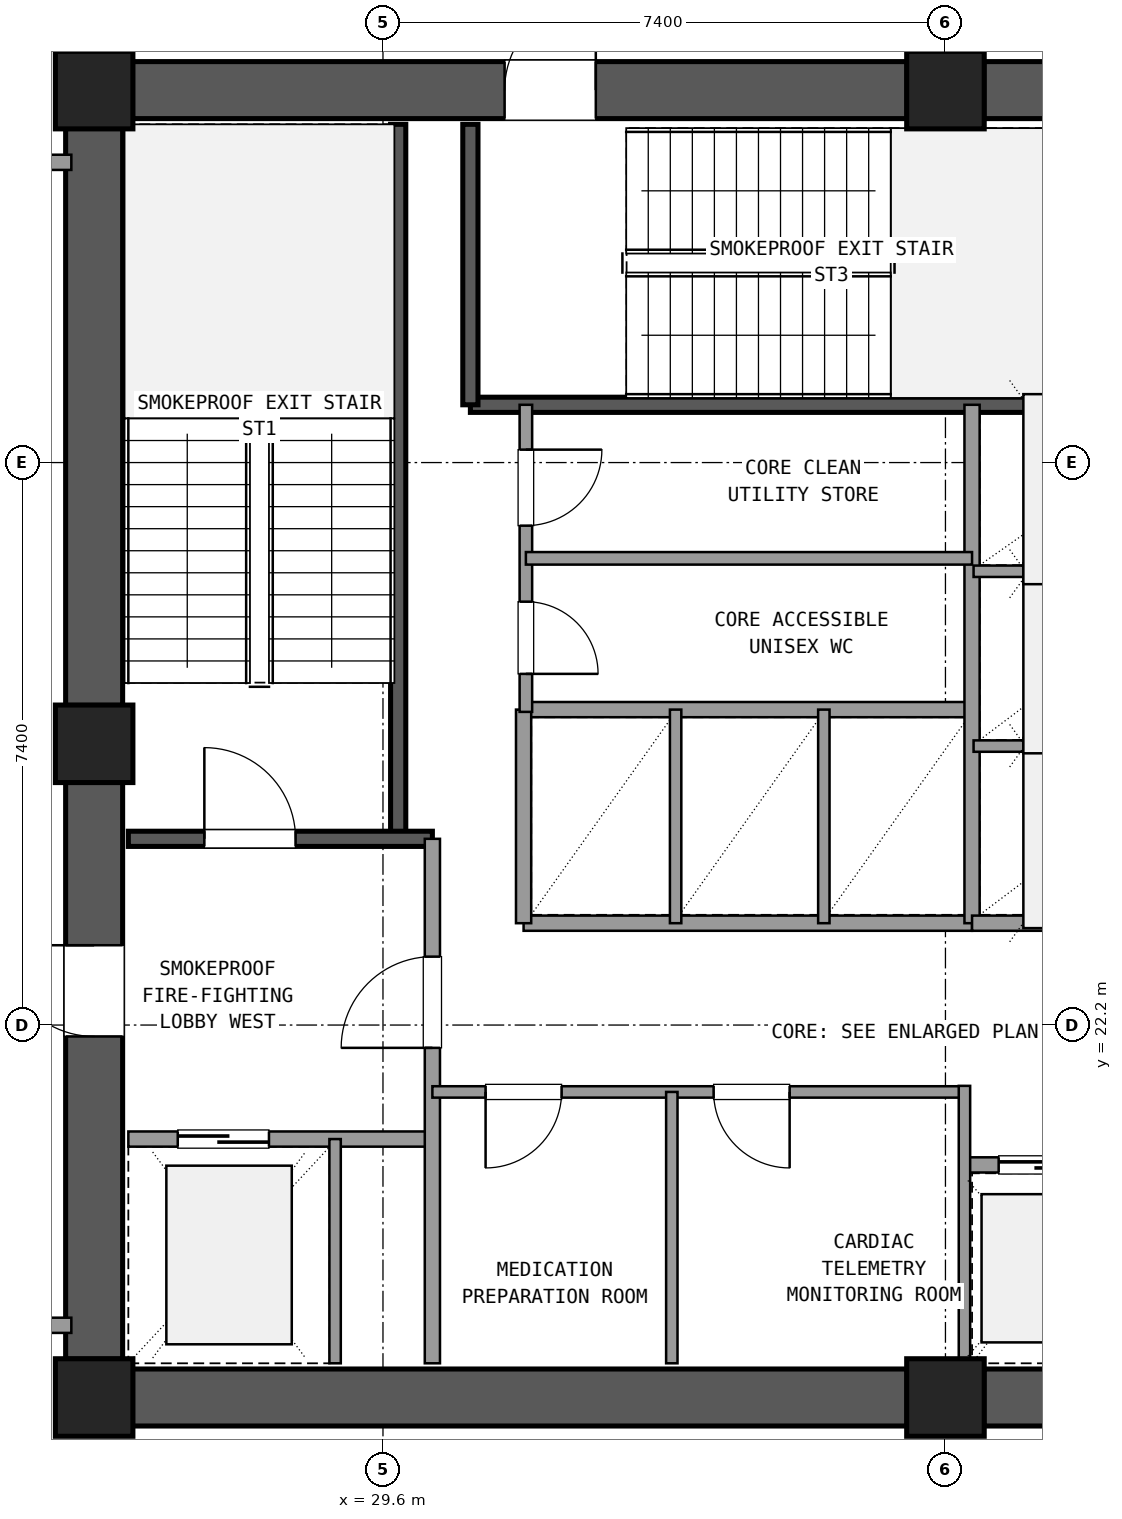
"""IFC4 building model, lengths in metres.
Left out: names, types, materials, properties, quantities, classifications, styles, units other than length and angle.
Written with IfcOpenShell. Run it as: python <this file> out.ifc"""

import sys

from ifc_helpers import new_model, si_unit, direction, frame, frame_2d, origin, origin_2d, place, context, subcontext, project, spatial, rectangle, extrude, element, fill, save


model = new_model("IFC4")
c1 = context("Model", 3, precision=1e-05, world=origin(), true_north=direction((0.0, 1.0)))
c2 = subcontext(c1, "Body", "Model", "MODEL_VIEW")
j1 = project(units=[si_unit("LENGTHUNIT", "METRE"), si_unit("PLANEANGLEUNIT", "RADIAN")], contexts=[c1])
p1 = place(None, origin())
s1 = spatial("IfcSite", under=j1, at=p1, CompositionType="ELEMENT")
p2 = place(p1, origin())
s2 = spatial("IfcBuilding", under=s1, at=p2, CompositionType="ELEMENT")
p3 = place(p2, frame((0.0, 0.0, 178.02)))
s3 = spatial("IfcBuildingStorey", under=s2, at=p3, CompositionType="ELEMENT", Elevation=178.02)
for number, where, z_axis, x_axis in (
    (1, (25.8, 17.3, 0.0), (0.0, 0.0, 1.0), (1.0, 0.0, 0.0)),
    (2, (37.0, 17.3, 0.0), (0.0, 0.0, 1.0), (1.0, 0.0, 0.0)),
    (3, (37.0, 34.5, 0.0), (0.0, 0.0, 1.0), (1.0, 0.0, 0.0)),
    (4, (25.8, 34.5, 0.0), (0.0, 0.0, 1.0), (1.0, 0.0, 0.0)),
    (5, (25.8, 25.9, 0.0), (0.0, 0.0, 1.0), (1.0, 0.0, 0.0)),
):
    element("IfcColumn", number, at=place(p3, frame(where, z_axis=z_axis, x_axis=x_axis)), inside=s3, PredefinedType="COLUMN", context=c2, shape_type="SweptSolid", body=[
        extrude(rectangle(XDim=1.02, YDim=1.02, at=origin_2d()), origin(), (0.0, 0.0, 1.0), 4.68),
    ])
for number, where, z_axis, x_axis in (
    (6, (26.305, 17.3, 0.0), (0.0, 0.0, 1.0), (1.0, 0.0, 0.0)),
    (7, (37.505, 17.3, 0.0), (0.0, 0.0, 1.0), (1.0, 0.0, 0.0)),
):
    element("IfcWall", number, at=place(p3, frame(where, z_axis=z_axis, x_axis=x_axis)), inside=s3, PredefinedType="SHEAR", context=c2, shape_type="SweptSolid", body=[
        extrude(rectangle(XDim=10.19, YDim=0.75, at=frame_2d((5.095, 0.0))), origin(), (0.0, 0.0, 1.0), 4.38),
    ])
p4 = place(p3, frame((47.695, 34.5, 0.0), z_axis=(0.0, 0.0, 1.0), x_axis=(-1.0, 0.0, 0.0)))
e8 = element("IfcWall", 8, at=p4, inside=s3, PredefinedType="SHEAR", context=c2, shape_type="SweptSolid", body=[
    extrude(rectangle(XDim=10.19, YDim=0.75, at=frame_2d((5.095, 0.0))), origin(), (0.0, 0.0, 1.0), 4.38),
])
p5 = place(p4, frame((4.595, 0.0, 0.0)))
e9 = element("IfcOpeningElement", 9, at=p5, cuts=e8, PredefinedType="OPENING", context=c2, shape_type="SweptSolid", body=[
    extrude(rectangle(XDim=1.6, YDim=2.2, at=frame_2d((0.8, 1.1))), frame((0.0, 0.385, 0.0), z_axis=(0.0, -1.0, 0.0), x_axis=(1.0, 0.0, 0.0)), (0.0, 0.0, 1.0), 0.77),
])
p6 = place(p3, frame((36.495, 34.5, 0.0), z_axis=(0.0, 0.0, 1.0), x_axis=(-1.0, 0.0, 0.0)))
e10 = element("IfcWall", 10, at=p6, inside=s3, PredefinedType="SHEAR", context=c2, shape_type="SweptSolid", body=[
    extrude(rectangle(XDim=10.19, YDim=0.75, at=frame_2d((5.095, 0.0))), origin(), (0.0, 0.0, 1.0), 4.38),
])
p7 = place(p6, frame((4.095, 0.0, 0.0)))
e11 = element("IfcOpeningElement", 11, at=p7, cuts=e10, PredefinedType="OPENING", context=c2, shape_type="SweptSolid", body=[
    extrude(rectangle(XDim=1.2, YDim=2.15, at=frame_2d((0.6, 1.075))), frame((0.0, 0.385, 0.0), z_axis=(0.0, -1.0, 0.0), x_axis=(1.0, 0.0, 0.0)), (0.0, 0.0, 1.0), 0.77),
])
p8 = place(p3, frame((25.8, 33.995, 0.0), z_axis=(0.0, 0.0, 1.0), x_axis=(0.0, -1.0, 0.0)))
e12 = element("IfcWall", 12, at=p8, inside=s3, PredefinedType="SHEAR", context=c2, shape_type="SweptSolid", body=[
    extrude(rectangle(XDim=7.59, YDim=0.75, at=frame_2d((3.795, 0.0))), origin(), (0.0, 0.0, 1.0), 4.38),
])
p9 = place(p3, frame((25.8, 25.395, 0.0), z_axis=(0.0, 0.0, 1.0), x_axis=(0.0, -1.0, 0.0)))
e13 = element("IfcWall", 13, at=p9, inside=s3, PredefinedType="SHEAR", context=c2, shape_type="SweptSolid", body=[
    extrude(rectangle(XDim=7.59, YDim=0.75, at=frame_2d((3.795, 0.0))), origin(), (0.0, 0.0, 1.0), 4.38),
])
p10 = place(p9, frame((2.145, 0.0, 0.0)))
e14 = element("IfcOpeningElement", 14, at=p10, cuts=e13, PredefinedType="OPENING", context=c2, shape_type="SweptSolid", body=[
    extrude(rectangle(XDim=1.2, YDim=2.15, at=frame_2d((0.6, 1.075))), frame((0.0, 0.385, 0.0), z_axis=(0.0, -1.0, 0.0), x_axis=(1.0, 0.0, 0.0)), (0.0, 0.0, 1.0), 0.77),
])
p11 = place(p3, frame((29.8, 24.65, 0.0), z_axis=(0.0, 0.0, 1.0), x_axis=(0.0, 1.0, 0.0)))
e15 = element("IfcWall", 15, at=p11, inside=s3, PredefinedType="SHEAR", context=c2, shape_type="SweptSolid", body=[
    extrude(rectangle(XDim=9.4, YDim=0.2, at=frame_2d((4.7, 0.0))), origin(), (0.0, 0.0, 1.0), 4.38),
])
p12 = place(p3, frame((26.25, 24.65, 0.0), z_axis=(0.0, 0.0, 1.0), x_axis=(1.0, 0.0, 0.0)))
e16 = element("IfcWall", 16, at=p12, inside=s3, PredefinedType="SHEAR", context=c2, shape_type="SweptSolid", body=[
    extrude(rectangle(XDim=4.0, YDim=0.2, at=frame_2d((2.0, 0.0))), origin(), (0.0, 0.0, 1.0), 4.38),
])
p13 = place(p12, frame((1.0, 0.0, 0.0)))
e17 = element("IfcOpeningElement", 17, at=p13, cuts=e16, PredefinedType="OPENING", context=c2, shape_type="SweptSolid", body=[
    extrude(rectangle(XDim=1.2, YDim=2.15, at=frame_2d((0.6, 1.075))), frame((0.0, 0.11, 0.0), z_axis=(0.0, -1.0, 0.0), x_axis=(1.0, 0.0, 0.0)), (0.0, 0.0, 1.0), 0.22),
])
p14 = place(p3, frame((30.75, 30.36, 0.0), z_axis=(0.0, 0.0, 1.0), x_axis=(1.0, 0.0, 0.0)))
e18 = element("IfcWall", 18, at=p14, inside=s3, PredefinedType="SHEAR", context=c2, shape_type="SweptSolid", body=[
    extrude(rectangle(XDim=9.5, YDim=0.2, at=frame_2d((4.75, 0.0))), origin(), (0.0, 0.0, 1.0), 4.38),
])
p15 = place(p3, frame((30.75, 30.36, 0.0), z_axis=(0.0, 0.0, 1.0), x_axis=(0.0, 1.0, 0.0)))
e19 = element("IfcWall", 19, at=p15, inside=s3, PredefinedType="SHEAR", context=c2, shape_type="SweptSolid", body=[
    extrude(rectangle(XDim=3.69, YDim=0.2, at=frame_2d((1.845, 0.0))), origin(), (0.0, 0.0, 1.0), 4.38),
])
p16 = place(p3, frame((26.25, 20.7, 0.0), z_axis=(0.0, 0.0, 1.0), x_axis=(1.0, 0.0, 0.0)))
e20 = element("IfcWall", 20, at=p16, inside=s3, PredefinedType="SOLIDWALL", context=c2, shape_type="SweptSolid", body=[
    extrude(rectangle(XDim=4.0, YDim=0.2, at=frame_2d((2.0, 0.0))), origin(), (0.0, 0.0, 1.0), 3.49),
])
p17 = place(p16, frame((0.65, 0.0, 0.0)))
e21 = element("IfcOpeningElement", 21, at=p17, cuts=e20, PredefinedType="OPENING", context=c2, shape_type="SweptSolid", body=[
    extrude(rectangle(XDim=1.2, YDim=2.15, at=frame_2d((0.6, 1.075))), frame((0.0, 0.11, 0.0), z_axis=(0.0, -1.0, 0.0), x_axis=(1.0, 0.0, 0.0)), (0.0, 0.0, 1.0), 0.22),
])
p18 = place(p3, frame((30.25, 17.75, 0.0), z_axis=(0.0, 0.0, 1.0), x_axis=(0.0, 1.0, 0.0)))
e22 = element("IfcWall", 22, at=p18, inside=s3, PredefinedType="SOLIDWALL", context=c2, shape_type="SweptSolid", body=[
    extrude(rectangle(XDim=6.9, YDim=0.2, at=frame_2d((3.45, 0.0))), origin(), (0.0, 0.0, 1.0), 3.49),
])
p19 = place(p18, frame((4.15, 0.0, 0.0)))
e23 = element("IfcOpeningElement", 23, at=p19, cuts=e22, PredefinedType="OPENING", context=c2, shape_type="SweptSolid", body=[
    extrude(rectangle(XDim=1.2, YDim=2.15, at=frame_2d((0.6, 1.075))), frame((0.0, 0.11, 0.0), z_axis=(0.0, -1.0, 0.0), x_axis=(1.0, 0.0, 0.0)), (0.0, 0.0, 1.0), 0.22),
])
p20 = place(p3, frame((28.97, 17.75, 0.0), z_axis=(0.0, 0.0, 1.0), x_axis=(0.0, 1.0, 0.0)))
e24 = element("IfcWall", 24, at=p20, inside=s3, PredefinedType="PARTITIONING", context=c2, shape_type="SweptSolid", body=[
    extrude(rectangle(XDim=2.95, YDim=0.15, at=frame_2d((1.475, 0.0))), origin(), (0.0, 0.0, 1.0), 3.49),
])
p21 = place(p3, frame((30.25, 21.32, 0.0), z_axis=(0.0, 0.0, 1.0), x_axis=(1.0, 0.0, 0.0)))
e25 = element("IfcWall", 25, at=p21, inside=s3, PredefinedType="PARTITIONING", context=c2, shape_type="SweptSolid", body=[
    extrude(rectangle(XDim=7.0, YDim=0.15, at=frame_2d((3.5, 0.0))), origin(), (0.0, 0.0, 1.0), 3.49),
])
p22 = place(p21, frame((0.7, 0.0, 0.0)))
e26 = element("IfcOpeningElement", 26, at=p22, cuts=e25, PredefinedType="OPENING", context=c2, shape_type="SweptSolid", body=[
    extrude(rectangle(XDim=1.0, YDim=2.15, at=frame_2d((0.5, 1.075))), frame((0.0, 0.085, 0.0), z_axis=(0.0, -1.0, 0.0), x_axis=(1.0, 0.0, 0.0)), (0.0, 0.0, 1.0), 0.17),
])
p23 = place(p21, frame((3.7, 0.0, 0.0)))
e27 = element("IfcOpeningElement", 27, at=p23, cuts=e25, PredefinedType="OPENING", context=c2, shape_type="SweptSolid", body=[
    extrude(rectangle(XDim=1.0, YDim=2.15, at=frame_2d((0.5, 1.075))), frame((0.0, 0.085, 0.0), z_axis=(0.0, -1.0, 0.0), x_axis=(1.0, 0.0, 0.0)), (0.0, 0.0, 1.0), 0.17),
])
p24 = place(p3, frame((33.4, 17.75, 0.0), z_axis=(0.0, 0.0, 1.0), x_axis=(0.0, 1.0, 0.0)))
e28 = element("IfcWall", 28, at=p24, inside=s3, PredefinedType="PARTITIONING", context=c2, shape_type="SweptSolid", body=[
    extrude(rectangle(XDim=3.57, YDim=0.15, at=frame_2d((1.785, 0.0))), origin(), (0.0, 0.0, 1.0), 3.49),
])
p25 = place(p3, frame((37.25, 20.36, 0.0), z_axis=(0.0, 0.0, 1.0), x_axis=(1.0, 0.0, 0.0)))
e29 = element("IfcWall", 29, at=p25, inside=s3, PredefinedType="SOLIDWALL", context=c2, shape_type="SweptSolid", body=[
    extrude(rectangle(XDim=6.1, YDim=0.2, at=frame_2d((3.05, 0.0))), origin(), (0.0, 0.0, 1.0), 3.49),
])
p26 = place(p25, frame((0.45, 0.0, 0.0)))
e30 = element("IfcOpeningElement", 30, at=p26, cuts=e29, PredefinedType="OPENING", context=c2, shape_type="SweptSolid", body=[
    extrude(rectangle(XDim=1.1, YDim=2.15, at=frame_2d((0.55, 1.075))), frame((0.0, 0.11, 0.0), z_axis=(0.0, -1.0, 0.0), x_axis=(1.0, 0.0, 0.0)), (0.0, 0.0, 1.0), 0.22),
])
p27 = place(p25, frame((2.5, 0.0, 0.0)))
e31 = element("IfcOpeningElement", 31, at=p27, cuts=e29, PredefinedType="OPENING", context=c2, shape_type="SweptSolid", body=[
    extrude(rectangle(XDim=1.1, YDim=2.15, at=frame_2d((0.55, 1.075))), frame((0.0, 0.11, 0.0), z_axis=(0.0, -1.0, 0.0), x_axis=(1.0, 0.0, 0.0)), (0.0, 0.0, 1.0), 0.22),
])
p28 = place(p25, frame((4.55, 0.0, 0.0)))
e32 = element("IfcOpeningElement", 32, at=p28, cuts=e29, PredefinedType="OPENING", context=c2, shape_type="SweptSolid", body=[
    extrude(rectangle(XDim=1.1, YDim=2.15, at=frame_2d((0.55, 1.075))), frame((0.0, 0.11, 0.0), z_axis=(0.0, -1.0, 0.0), x_axis=(1.0, 0.0, 0.0)), (0.0, 0.0, 1.0), 0.22),
])
p29 = place(p3, frame((37.25, 17.75, 0.0), z_axis=(0.0, 0.0, 1.0), x_axis=(0.0, 1.0, 0.0)))
e33 = element("IfcWall", 33, at=p29, inside=s3, PredefinedType="PARTITIONING", context=c2, shape_type="SweptSolid", body=[
    extrude(rectangle(XDim=3.65, YDim=0.15, at=frame_2d((1.825, 0.0))), origin(), (0.0, 0.0, 1.0), 3.49),
])
for number, where, z_axis, x_axis in (
    (34, (31.45, 23.54, 0.0), (0.0, 0.0, 1.0), (1.0, 0.0, 0.0)),
    (35, (31.45, 26.35, 0.0), (0.0, 0.0, 1.0), (1.0, 0.0, 0.0)),
):
    element("IfcWall", number, at=place(p3, frame(where, z_axis=z_axis, x_axis=x_axis)), inside=s3, PredefinedType="SOLIDWALL", context=c2, shape_type="SweptSolid", body=[
        extrude(rectangle(XDim=5.9, YDim=0.2, at=frame_2d((2.95, 0.0))), origin(), (0.0, 0.0, 1.0), 3.49),
    ])
p30 = place(p3, frame((31.45, 23.54, 0.0), z_axis=(0.0, 0.0, 1.0), x_axis=(0.0, 1.0, 0.0)))
e36 = element("IfcWall", 36, at=p30, inside=s3, PredefinedType="SOLIDWALL", context=c2, shape_type="SweptSolid", body=[
    extrude(rectangle(XDim=2.81, YDim=0.2, at=frame_2d((1.405, 0.0))), origin(), (0.0, 0.0, 1.0), 3.49),
])
for number, where, z_axis, x_axis in (
    (37, (33.45, 23.54, 0.0), (0.0, 0.0, 1.0), (0.0, 1.0, 0.0)),
    (38, (35.4, 23.54, 0.0), (0.0, 0.0, 1.0), (0.0, 1.0, 0.0)),
):
    element("IfcWall", number, at=place(p3, frame(where, z_axis=z_axis, x_axis=x_axis)), inside=s3, PredefinedType="PARTITIONING", context=c2, shape_type="SweptSolid", body=[
        extrude(rectangle(XDim=2.81, YDim=0.15, at=frame_2d((1.405, 0.0))), origin(), (0.0, 0.0, 1.0), 3.49),
    ])
p31 = place(p3, frame((37.35, 23.54, 0.0), z_axis=(0.0, 0.0, 1.0), x_axis=(0.0, 1.0, 0.0)))
e39 = element("IfcWall", 39, at=p31, inside=s3, PredefinedType="SOLIDWALL", context=c2, shape_type="SweptSolid", body=[
    extrude(rectangle(XDim=6.82, YDim=0.2, at=frame_2d((3.41, 0.0))), origin(), (0.0, 0.0, 1.0), 3.49),
])
p32 = place(p3, frame((37.35, 23.54, 0.0), z_axis=(0.0, 0.0, 1.0), x_axis=(1.0, 0.0, 0.0)))
e40 = element("IfcWall", 40, at=p32, inside=s3, PredefinedType="SOLIDWALL", context=c2, shape_type="SweptSolid", body=[
    extrude(rectangle(XDim=3.05, YDim=0.2, at=frame_2d((1.525, 0.0))), origin(), (0.0, 0.0, 1.0), 3.49),
])
for number, where, z_axis, x_axis in (
    (41, (37.37, 25.87, 0.0), (0.0, 0.0, 1.0), (1.0, 0.0, 0.0)),
    (42, (37.37, 28.17, 0.0), (0.0, 0.0, 1.0), (1.0, 0.0, 0.0)),
):
    element("IfcWall", number, at=place(p3, frame(where, z_axis=z_axis, x_axis=x_axis)), inside=s3, PredefinedType="PARTITIONING", context=c2, shape_type="SweptSolid", body=[
        extrude(rectangle(XDim=3.01, YDim=0.15, at=frame_2d((1.505, 0.0))), origin(), (0.0, 0.0, 1.0), 3.49),
    ])
p33 = place(p3, frame((31.48, 26.32, 0.0), z_axis=(0.0, 0.0, 1.0), x_axis=(0.0, 1.0, 0.0)))
e43 = element("IfcWall", 43, at=p33, inside=s3, PredefinedType="PLUMBINGWALL", context=c2, shape_type="SweptSolid", body=[
    extrude(rectangle(XDim=4.04, YDim=0.165, at=frame_2d((2.02, 0.0))), origin(), (0.0, 0.0, 1.0), 3.49),
])
p34 = place(p33, frame((0.5, 0.0, 0.0)))
e44 = element("IfcOpeningElement", 44, at=p34, cuts=e43, PredefinedType="OPENING", context=c2, shape_type="SweptSolid", body=[
    extrude(rectangle(XDim=0.95, YDim=2.1, at=frame_2d((0.475, 1.05))), frame((0.0, 0.093, 0.0), z_axis=(0.0, -1.0, 0.0), x_axis=(1.0, 0.0, 0.0)), (0.0, 0.0, 1.0), 0.185),
])
p35 = place(p33, frame((2.45, 0.0, 0.0)))
e45 = element("IfcOpeningElement", 45, at=p35, cuts=e43, PredefinedType="OPENING", context=c2, shape_type="SweptSolid", body=[
    extrude(rectangle(XDim=1.0, YDim=2.15, at=frame_2d((0.5, 1.075))), frame((0.0, 0.093, 0.0), z_axis=(0.0, -1.0, 0.0), x_axis=(1.0, 0.0, 0.0)), (0.0, 0.0, 1.0), 0.185),
])
p36 = place(p3, frame((31.48, 28.34, 0.0), z_axis=(0.0, 0.0, 1.0), x_axis=(1.0, 0.0, 0.0)))
e46 = element("IfcWall", 46, at=p36, inside=s3, PredefinedType="PLUMBINGWALL", context=c2, shape_type="SweptSolid", body=[
    extrude(rectangle(XDim=5.87, YDim=0.165, at=frame_2d((2.935, 0.0))), origin(), (0.0, 0.0, 1.0), 3.49),
])
p37 = place(p3, frame((26.0, 34.8, 0.0), z_axis=(0.0, 0.0, 1.0), x_axis=(0.0, 1.0, 0.0)))
e47 = element("IfcWall", 47, at=p37, inside=s3, PredefinedType="SOLIDWALL", context=c2, shape_type="SweptSolid", body=[
    extrude(rectangle(XDim=10.4, YDim=0.2, at=frame_2d((5.2, 0.0))), origin(), (0.0, 0.0, 1.0), 3.49),
])
for number, where, z_axis, x_axis in (
    (48, (16.4, 18.25, 0.0), (0.0, 0.0, 1.0), (1.0, 0.0, 0.0)),
    (49, (16.4, 33.55, 0.0), (0.0, 0.0, 1.0), (1.0, 0.0, 0.0)),
):
    element("IfcWall", number, at=place(p3, frame(where, z_axis=z_axis, x_axis=x_axis)), inside=s3, PredefinedType="SOLIDWALL", context=c2, shape_type="SweptSolid", body=[
        extrude(rectangle(XDim=9.1, YDim=0.2, at=frame_2d((4.55, 0.0))), origin(), (0.0, 0.0, 1.0), 3.49),
    ])
p38 = place(p13, origin())
e50 = element("IfcDoor", 50, at=p38, inside=s3, OperationType="SINGLE_SWING_LEFT", PredefinedType="DOOR", context=c2, shape_type="SweptSolid", body=[
    extrude(rectangle(XDim=1.2, YDim=2.15, at=frame_2d((0.6, 1.075))), frame((0.0, 0.025, 0.0), z_axis=(0.0, -1.0, 0.0), x_axis=(1.0, 0.0, 0.0)), (0.0, 0.0, 1.0), 0.05),
])
fill(e17, e50)
p39 = place(p17, origin())
e51 = element("IfcDoor", 51, at=p39, inside=s3, OperationType="SLIDING_TO_LEFT", PredefinedType="DOOR", context=c2, shape_type="SweptSolid", body=[
    extrude(rectangle(XDim=1.2, YDim=2.15, at=frame_2d((0.6, 1.075))), frame((0.0, 0.025, 0.0), z_axis=(0.0, -1.0, 0.0), x_axis=(1.0, 0.0, 0.0)), (0.0, 0.0, 1.0), 0.05),
])
fill(e21, e51)
p40 = place(p19, origin())
e52 = element("IfcDoor", 52, at=p40, inside=s3, OperationType="SINGLE_SWING_LEFT", PredefinedType="DOOR", context=c2, shape_type="SweptSolid", body=[
    extrude(rectangle(XDim=1.2, YDim=2.15, at=frame_2d((0.6, 1.075))), frame((0.0, 0.025, 0.0), z_axis=(0.0, -1.0, 0.0), x_axis=(1.0, 0.0, 0.0)), (0.0, 0.0, 1.0), 0.05),
])
fill(e23, e52)
p41 = place(p10, frame((1.2, 0.0, 0.0), z_axis=(0.0, 0.0, 1.0), x_axis=(-1.0, 0.0, 0.0)))
e53 = element("IfcDoor", 53, at=p41, inside=s3, OperationType="SINGLE_SWING_LEFT", PredefinedType="DOOR", context=c2, shape_type="SweptSolid", body=[
    extrude(rectangle(XDim=1.2, YDim=2.15, at=frame_2d((0.6, 1.075))), frame((0.0, 0.025, 0.0), z_axis=(0.0, -1.0, 0.0), x_axis=(1.0, 0.0, 0.0)), (0.0, 0.0, 1.0), 0.05),
])
fill(e14, e53)
p42 = place(p7, frame((1.2, 0.0, 0.0), z_axis=(0.0, 0.0, 1.0), x_axis=(-1.0, 0.0, 0.0)))
e54 = element("IfcDoor", 54, at=p42, inside=s3, OperationType="SINGLE_SWING_LEFT", PredefinedType="DOOR", context=c2, shape_type="SweptSolid", body=[
    extrude(rectangle(XDim=1.2, YDim=2.15, at=frame_2d((0.6, 1.075))), frame((0.0, 0.025, 0.0), z_axis=(0.0, -1.0, 0.0), x_axis=(1.0, 0.0, 0.0)), (0.0, 0.0, 1.0), 0.05),
])
fill(e11, e54)
p43 = place(p22, frame((1.0, 0.0, 0.0), z_axis=(0.0, 0.0, 1.0), x_axis=(-1.0, 0.0, 0.0)))
e55 = element("IfcDoor", 55, at=p43, inside=s3, OperationType="SINGLE_SWING_LEFT", PredefinedType="DOOR", context=c2, shape_type="SweptSolid", body=[
    extrude(rectangle(XDim=1.0, YDim=2.15, at=frame_2d((0.5, 1.075))), frame((0.0, 0.025, 0.0), z_axis=(0.0, -1.0, 0.0), x_axis=(1.0, 0.0, 0.0)), (0.0, 0.0, 1.0), 0.05),
])
fill(e26, e55)
p44 = place(p23, frame((1.0, 0.0, 0.0), z_axis=(0.0, 0.0, 1.0), x_axis=(-1.0, 0.0, 0.0)))
e56 = element("IfcDoor", 56, at=p44, inside=s3, OperationType="SINGLE_SWING_RIGHT", PredefinedType="DOOR", context=c2, shape_type="SweptSolid", body=[
    extrude(rectangle(XDim=1.0, YDim=2.15, at=frame_2d((0.5, 1.075))), frame((0.0, 0.025, 0.0), z_axis=(0.0, -1.0, 0.0), x_axis=(1.0, 0.0, 0.0)), (0.0, 0.0, 1.0), 0.05),
])
fill(e27, e56)
p45 = place(p26, origin())
e57 = element("IfcDoor", 57, at=p45, inside=s3, OperationType="SLIDING_TO_LEFT", PredefinedType="DOOR", context=c2, shape_type="SweptSolid", body=[
    extrude(rectangle(XDim=1.1, YDim=2.15, at=frame_2d((0.55, 1.075))), frame((0.0, 0.025, 0.0), z_axis=(0.0, -1.0, 0.0), x_axis=(1.0, 0.0, 0.0)), (0.0, 0.0, 1.0), 0.05),
])
fill(e30, e57)
p46 = place(p34, frame((0.95, 0.0, 0.0), z_axis=(0.0, 0.0, 1.0), x_axis=(-1.0, 0.0, 0.0)))
e58 = element("IfcDoor", 58, at=p46, inside=s3, OperationType="SINGLE_SWING_LEFT", PredefinedType="DOOR", context=c2, shape_type="SweptSolid", body=[
    extrude(rectangle(XDim=0.95, YDim=2.1, at=frame_2d((0.475, 1.05))), frame((0.0, 0.025, 0.0), z_axis=(0.0, -1.0, 0.0), x_axis=(1.0, 0.0, 0.0)), (0.0, 0.0, 1.0), 0.05),
])
fill(e44, e58)
p47 = place(p35, frame((1.0, 0.0, 0.0), z_axis=(0.0, 0.0, 1.0), x_axis=(-1.0, 0.0, 0.0)))
e59 = element("IfcDoor", 59, at=p47, inside=s3, OperationType="SINGLE_SWING_RIGHT", PredefinedType="DOOR", context=c2, shape_type="SweptSolid", body=[
    extrude(rectangle(XDim=1.0, YDim=2.15, at=frame_2d((0.5, 1.075))), frame((0.0, 0.025, 0.0), z_axis=(0.0, -1.0, 0.0), x_axis=(1.0, 0.0, 0.0)), (0.0, 0.0, 1.0), 0.05),
])
fill(e45, e59)
save(model, sys.argv[1])
